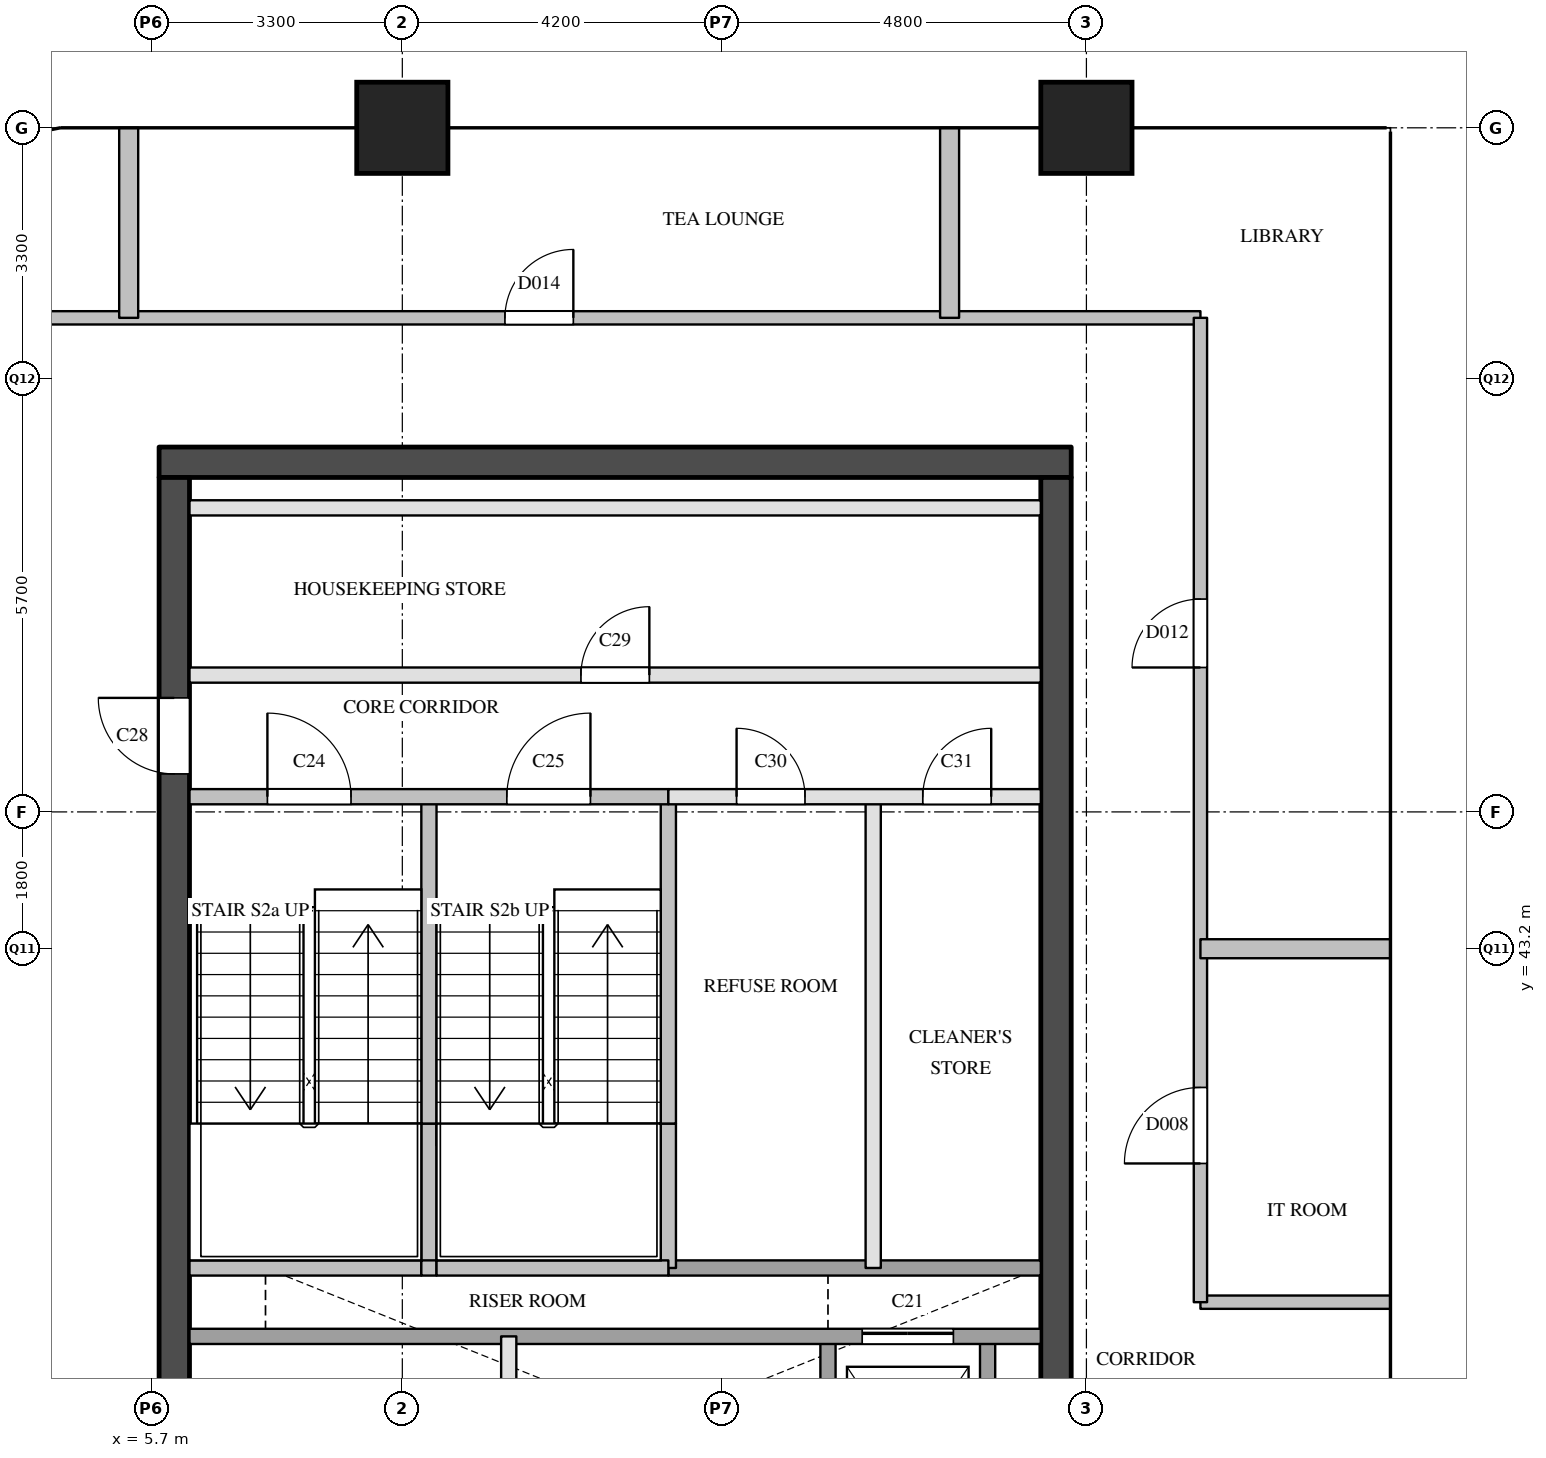
"""IFC4 building model, lengths in metres.
Left out: names, types, materials, properties, quantities, classifications, styles, units other than length and angle.
Written with IfcOpenShell. Run it as: python <this file> out.ifc"""

import sys

from ifc_helpers import new_model, si_unit, direction, frame, frame_2d, origin, origin_2d, place, context, subcontext, project, spatial, rectangle, extrude, element, fill, save


model = new_model("IFC4")
c1 = context("Model", 3, precision=1e-05, world=origin(), true_north=direction((0.0, 1.0)))
c2 = subcontext(c1, "Body", "Model", "MODEL_VIEW")
j1 = project(units=[si_unit("LENGTHUNIT", "METRE"), si_unit("PLANEANGLEUNIT", "RADIAN")], contexts=[c1])
p1 = place(None, origin())
s1 = spatial("IfcSite", under=j1, at=p1, CompositionType="ELEMENT")
p2 = place(p1, origin())
s2 = spatial("IfcBuilding", under=s1, at=p2, CompositionType="ELEMENT")
p3 = place(p2, frame((0.0, 0.0, 207.2)))
s3 = spatial("IfcBuildingStorey", under=s2, at=p3, CompositionType="ELEMENT", Elevation=207.2)
for number, where, z_axis, x_axis in (
    (1, (9.0, 54.0, 0.0), (0.0, 0.0, 1.0), (1.0, 0.0, 0.0)),
    (2, (18.0, 54.0, 0.0), (0.0, 0.0, 1.0), (1.0, 0.0, 0.0)),
):
    element("IfcColumn", number, at=place(p3, frame(where, z_axis=z_axis, x_axis=x_axis)), inside=s3, PredefinedType="COLUMN", context=c2, shape_type="SweptSolid", body=[
        extrude(rectangle(XDim=1.2, YDim=1.2, at=origin_2d()), origin(), (0.0, 0.0, 1.0), 3.9),
    ])
p4 = place(p3, frame((5.8, 49.6, 0.0), z_axis=(0.0, 0.0, 1.0), x_axis=(1.0, 0.0, 0.0)))
e3 = element("IfcWall", 3, at=p4, inside=s3, PredefinedType="SHEAR", context=c2, shape_type="SweptSolid", body=[
    extrude(rectangle(XDim=12.0, YDim=0.4, at=frame_2d((6.0, 0.0))), origin(), (0.0, 0.0, 1.0), 3.6),
])
p5 = place(p3, frame((6.0, 29.1, 0.0), z_axis=(0.0, 0.0, 1.0), x_axis=(0.0, 1.0, 0.0)))
e4 = element("IfcWall", 4, at=p5, inside=s3, PredefinedType="SHEAR", context=c2, shape_type="SweptSolid", body=[
    extrude(rectangle(XDim=20.3, YDim=0.4, at=frame_2d((10.15, 0.0))), origin(), (0.0, 0.0, 1.0), 3.6),
])
p6 = place(p5, frame((3.45, 0.0, 0.0)))
e5 = element("IfcOpeningElement", 5, at=p6, cuts=e4, PredefinedType="OPENING", context=c2, shape_type="SweptSolid", body=[
    extrude(rectangle(XDim=1.0, YDim=2.1, at=frame_2d((0.5, 1.05))), frame((0.0, 0.21, 0.0), z_axis=(0.0, -1.0, 0.0), x_axis=(1.0, 0.0, 0.0)), (0.0, 0.0, 1.0), 0.42),
])
p7 = place(p5, frame((16.4, 0.0, 0.0)))
e6 = element("IfcOpeningElement", 6, at=p7, cuts=e4, PredefinedType="OPENING", context=c2, shape_type="SweptSolid", body=[
    extrude(rectangle(XDim=1.0, YDim=2.1, at=frame_2d((0.5, 1.05))), frame((0.0, 0.21, 0.0), z_axis=(0.0, -1.0, 0.0), x_axis=(1.0, 0.0, 0.0)), (0.0, 0.0, 1.0), 0.42),
])
p8 = place(p3, frame((17.6, 29.1, 0.0), z_axis=(0.0, 0.0, 1.0), x_axis=(0.0, 1.0, 0.0)))
e7 = element("IfcWall", 7, at=p8, inside=s3, PredefinedType="SHEAR", context=c2, shape_type="SweptSolid", body=[
    extrude(rectangle(XDim=20.3, YDim=0.4, at=frame_2d((10.15, 0.0))), origin(), (0.0, 0.0, 1.0), 3.6),
])
p9 = place(p8, frame((1.25, 0.0, 0.0)))
e8 = element("IfcOpeningElement", 8, at=p9, cuts=e7, PredefinedType="OPENING", context=c2, shape_type="SweptSolid", body=[
    extrude(rectangle(XDim=0.7, YDim=2.1, at=frame_2d((0.35, 1.05))), frame((0.0, 0.21, 0.0), z_axis=(0.0, -1.0, 0.0), x_axis=(1.0, 0.0, 0.0)), (0.0, 0.0, 1.0), 0.42),
])
p10 = place(p8, frame((7.05, 0.0, 0.0)))
e9 = element("IfcOpeningElement", 9, at=p10, cuts=e7, PredefinedType="OPENING", context=c2, shape_type="SweptSolid", body=[
    extrude(rectangle(XDim=0.7, YDim=2.1, at=frame_2d((0.35, 1.05))), frame((0.0, 0.21, 0.0), z_axis=(0.0, -1.0, 0.0), x_axis=(1.0, 0.0, 0.0)), (0.0, 0.0, 1.0), 0.42),
])
p11 = place(p8, frame((3.6, 0.0, 0.0)))
e10 = element("IfcOpeningElement", 10, at=p11, cuts=e7, PredefinedType="OPENING", context=c2, shape_type="SweptSolid", body=[
    extrude(rectangle(XDim=1.8, YDim=2.1, at=frame_2d((0.9, 1.05))), frame((0.0, 0.21, 0.0), z_axis=(0.0, -1.0, 0.0), x_axis=(1.0, 0.0, 0.0)), (0.0, 0.0, 1.0), 0.42),
])
p12 = place(p3, frame((9.35, 39.0, 0.0), z_axis=(0.0, 0.0, 1.0), x_axis=(0.0, 1.0, 0.0)))
e11 = element("IfcWall", 11, at=p12, inside=s3, PredefinedType="SOLIDWALL", context=c2, shape_type="SweptSolid", body=[
    extrude(rectangle(XDim=1.9, YDim=0.2, at=frame_2d((0.95, 0.0))), origin(), (0.0, 0.0, 1.0), 3.6),
])
p13 = place(p3, frame((9.35, 40.9, 0.0), z_axis=(0.0, 0.0, 1.0), x_axis=(0.0, 1.0, 0.0)))
e12 = element("IfcWall", 12, at=p13, inside=s3, PredefinedType="SOLIDWALL", context=c2, shape_type="SweptSolid", body=[
    extrude(rectangle(XDim=4.3, YDim=0.2, at=frame_2d((2.15, 0.0))), origin(), (0.0, 0.0, 1.0), 3.6),
])
p14 = place(p3, frame((10.4, 33.8, 0.0), z_axis=(0.0, 0.0, 1.0), x_axis=(0.0, 1.0, 0.0)))
e13 = element("IfcWall", 13, at=p14, inside=s3, PredefinedType="PARTITIONING", context=c2, shape_type="SweptSolid", body=[
    extrude(rectangle(XDim=4.3, YDim=0.2, at=frame_2d((2.15, 0.0))), origin(), (0.0, 0.0, 1.0), 3.6),
])
p15 = place(p3, frame((12.5, 39.0, 0.0), z_axis=(0.0, 0.0, 1.0), x_axis=(0.0, 1.0, 0.0)))
e14 = element("IfcWall", 14, at=p15, inside=s3, PredefinedType="SOLIDWALL", context=c2, shape_type="SweptSolid", body=[
    extrude(rectangle(XDim=1.9, YDim=0.2, at=frame_2d((0.95, 0.0))), origin(), (0.0, 0.0, 1.0), 3.6),
])
p16 = place(p3, frame((12.5, 40.9, 0.0), z_axis=(0.0, 0.0, 1.0), x_axis=(0.0, 1.0, 0.0)))
e15 = element("IfcWall", 15, at=p16, inside=s3, PredefinedType="SOLIDWALL", context=c2, shape_type="SweptSolid", body=[
    extrude(rectangle(XDim=4.3, YDim=0.2, at=frame_2d((2.15, 0.0))), origin(), (0.0, 0.0, 1.0), 3.6),
])
p17 = place(p3, frame((14.6, 34.9, 0.0), z_axis=(0.0, 0.0, 1.0), x_axis=(0.0, 1.0, 0.0)))
e16 = element("IfcWall", 16, at=p17, inside=s3, PredefinedType="SOLIDWALL", context=c2, shape_type="SweptSolid", body=[
    extrude(rectangle(XDim=3.2, YDim=0.2, at=frame_2d((1.6, 0.0))), origin(), (0.0, 0.0, 1.0), 3.6),
])
p18 = place(p3, frame((15.195, 39.0, 0.0), z_axis=(0.0, 0.0, 1.0), x_axis=(0.0, 1.0, 0.0)))
e17 = element("IfcWall", 17, at=p18, inside=s3, PredefinedType="PARTITIONING", context=c2, shape_type="SweptSolid", body=[
    extrude(rectangle(XDim=6.2, YDim=0.2, at=frame_2d((3.1, 0.0))), origin(), (0.0, 0.0, 1.0), 3.6),
])
p19 = place(p3, frame((16.7, 34.9, 0.0), z_axis=(0.0, 0.0, 1.0), x_axis=(0.0, 1.0, 0.0)))
e18 = element("IfcWall", 18, at=p19, inside=s3, PredefinedType="SOLIDWALL", context=c2, shape_type="SweptSolid", body=[
    extrude(rectangle(XDim=3.2, YDim=0.2, at=frame_2d((1.6, 0.0))), origin(), (0.0, 0.0, 1.0), 3.6),
])
p20 = place(p3, frame((6.2, 38.1, 0.0), z_axis=(0.0, 0.0, 1.0), x_axis=(1.0, 0.0, 0.0)))
e19 = element("IfcWall", 19, at=p20, inside=s3, PredefinedType="SOLIDWALL", context=c2, shape_type="SweptSolid", body=[
    extrude(rectangle(XDim=11.2, YDim=0.2, at=frame_2d((5.6, 0.0))), origin(), (0.0, 0.0, 1.0), 3.6),
])
p21 = place(p20, frame((8.85, 0.0, 0.0)))
e20 = element("IfcOpeningElement", 20, at=p21, cuts=e19, PredefinedType="OPENING", context=c2, shape_type="SweptSolid", body=[
    extrude(rectangle(XDim=1.2, YDim=2.1, at=frame_2d((0.6, 1.05))), frame((0.0, 0.11, 0.0), z_axis=(0.0, -1.0, 0.0), x_axis=(1.0, 0.0, 0.0)), (0.0, 0.0, 1.0), 0.22),
])
p22 = place(p3, frame((12.5, 39.0, 0.0), z_axis=(0.0, 0.0, 1.0), x_axis=(1.0, 0.0, 0.0)))
e21 = element("IfcWall", 21, at=p22, inside=s3, PredefinedType="SOLIDWALL", context=c2, shape_type="SweptSolid", body=[
    extrude(rectangle(XDim=4.9, YDim=0.2, at=frame_2d((2.45, 0.0))), origin(), (0.0, 0.0, 1.0), 3.6),
])
p23 = place(p3, frame((6.2, 39.0, 0.0), z_axis=(0.0, 0.0, 1.0), x_axis=(1.0, 0.0, 0.0)))
e22 = element("IfcWall", 22, at=p23, inside=s3, PredefinedType="SOLIDWALL", context=c2, shape_type="SweptSolid", body=[
    extrude(rectangle(XDim=3.05, YDim=0.2, at=frame_2d((1.525, 0.0))), origin(), (0.0, 0.0, 1.0), 3.6),
])
p24 = place(p3, frame((9.25, 39.0, 0.0), z_axis=(0.0, 0.0, 1.0), x_axis=(1.0, 0.0, 0.0)))
e23 = element("IfcWall", 23, at=p24, inside=s3, PredefinedType="SOLIDWALL", context=c2, shape_type="SweptSolid", body=[
    extrude(rectangle(XDim=0.2, YDim=0.2, at=frame_2d((0.1, 0.0))), origin(), (0.0, 0.0, 1.0), 3.6),
])
p25 = place(p3, frame((9.45, 39.0, 0.0), z_axis=(0.0, 0.0, 1.0), x_axis=(1.0, 0.0, 0.0)))
e24 = element("IfcWall", 24, at=p25, inside=s3, PredefinedType="SOLIDWALL", context=c2, shape_type="SweptSolid", body=[
    extrude(rectangle(XDim=3.05, YDim=0.2, at=frame_2d((1.525, 0.0))), origin(), (0.0, 0.0, 1.0), 3.6),
])
p26 = place(p3, frame((12.5, 45.2, 0.0), z_axis=(0.0, 0.0, 1.0), x_axis=(1.0, 0.0, 0.0)))
e25 = element("IfcWall", 25, at=p26, inside=s3, PredefinedType="PARTITIONING", context=c2, shape_type="SweptSolid", body=[
    extrude(rectangle(XDim=4.9, YDim=0.2, at=frame_2d((2.45, 0.0))), origin(), (0.0, 0.0, 1.0), 3.6),
])
p27 = place(p26, frame((0.897, 0.0, 0.0)))
e26 = element("IfcOpeningElement", 26, at=p27, cuts=e25, PredefinedType="OPENING", context=c2, shape_type="SweptSolid", body=[
    extrude(rectangle(XDim=0.9, YDim=2.1, at=frame_2d((0.45, 1.05))), frame((0.0, 0.11, 0.0), z_axis=(0.0, -1.0, 0.0), x_axis=(1.0, 0.0, 0.0)), (0.0, 0.0, 1.0), 0.22),
])
p28 = place(p26, frame((3.347, 0.0, 0.0)))
e27 = element("IfcOpeningElement", 27, at=p28, cuts=e25, PredefinedType="OPENING", context=c2, shape_type="SweptSolid", body=[
    extrude(rectangle(XDim=0.9, YDim=2.1, at=frame_2d((0.45, 1.05))), frame((0.0, 0.11, 0.0), z_axis=(0.0, -1.0, 0.0), x_axis=(1.0, 0.0, 0.0)), (0.0, 0.0, 1.0), 0.22),
])
p29 = place(p3, frame((6.2, 45.2, 0.0), z_axis=(0.0, 0.0, 1.0), x_axis=(1.0, 0.0, 0.0)))
e28 = element("IfcWall", 28, at=p29, inside=s3, PredefinedType="SOLIDWALL", context=c2, shape_type="SweptSolid", body=[
    extrude(rectangle(XDim=6.3, YDim=0.2, at=frame_2d((3.15, 0.0))), origin(), (0.0, 0.0, 1.0), 3.6),
])
p30 = place(p29, frame((1.025, 0.0, 0.0)))
e29 = element("IfcOpeningElement", 29, at=p30, cuts=e28, PredefinedType="OPENING", context=c2, shape_type="SweptSolid", body=[
    extrude(rectangle(XDim=1.1, YDim=2.1, at=frame_2d((0.55, 1.05))), frame((0.0, 0.11, 0.0), z_axis=(0.0, -1.0, 0.0), x_axis=(1.0, 0.0, 0.0)), (0.0, 0.0, 1.0), 0.22),
])
p31 = place(p29, frame((4.175, 0.0, 0.0)))
e30 = element("IfcOpeningElement", 30, at=p31, cuts=e28, PredefinedType="OPENING", context=c2, shape_type="SweptSolid", body=[
    extrude(rectangle(XDim=1.1, YDim=2.1, at=frame_2d((0.55, 1.05))), frame((0.0, 0.11, 0.0), z_axis=(0.0, -1.0, 0.0), x_axis=(1.0, 0.0, 0.0)), (0.0, 0.0, 1.0), 0.22),
])
p32 = place(p3, frame((6.2, 46.8, 0.0), z_axis=(0.0, 0.0, 1.0), x_axis=(1.0, 0.0, 0.0)))
e31 = element("IfcWall", 31, at=p32, inside=s3, PredefinedType="PARTITIONING", context=c2, shape_type="SweptSolid", body=[
    extrude(rectangle(XDim=11.2, YDim=0.2, at=frame_2d((5.6, 0.0))), origin(), (0.0, 0.0, 1.0), 3.6),
])
p33 = place(p32, frame((5.15, 0.0, 0.0)))
e32 = element("IfcOpeningElement", 32, at=p33, cuts=e31, PredefinedType="OPENING", context=c2, shape_type="SweptSolid", body=[
    extrude(rectangle(XDim=0.9, YDim=2.1, at=frame_2d((0.45, 1.05))), frame((0.0, 0.11, 0.0), z_axis=(0.0, -1.0, 0.0), x_axis=(1.0, 0.0, 0.0)), (0.0, 0.0, 1.0), 0.22),
])
p34 = place(p3, frame((6.2, 49.0, 0.0), z_axis=(0.0, 0.0, 1.0), x_axis=(1.0, 0.0, 0.0)))
e33 = element("IfcWall", 33, at=p34, inside=s3, PredefinedType="PARTITIONING", context=c2, shape_type="SweptSolid", body=[
    extrude(rectangle(XDim=11.2, YDim=0.2, at=frame_2d((5.6, 0.0))), origin(), (0.0, 0.0, 1.0), 3.6),
])
p35 = place(p3, frame((19.5, 38.55, 0.0), z_axis=(0.0, 0.0, 1.0), x_axis=(1.0, 0.0, 0.0)))
e34 = element("IfcWall", 34, at=p35, inside=s3, PredefinedType="PARTITIONING", context=c2, shape_type="SweptSolid", body=[
    extrude(rectangle(XDim=2.5, YDim=0.175, at=frame_2d((1.25, 0.0))), origin(), (0.0, 0.0, 1.0), 3.6),
])
p36 = place(p3, frame((4.1, 51.5, 0.0), z_axis=(0.0, 0.0, 1.0), x_axis=(1.0, 0.0, 0.0)))
e35 = element("IfcWall", 35, at=p36, inside=s3, PredefinedType="PARTITIONING", context=c2, shape_type="SweptSolid", body=[
    extrude(rectangle(XDim=15.4, YDim=0.175, at=frame_2d((7.7, 0.0))), origin(), (0.0, 0.0, 1.0), 3.6),
])
p37 = place(p36, frame((6.25, 0.0, 0.0)))
e36 = element("IfcOpeningElement", 36, at=p37, cuts=e35, PredefinedType="OPENING", context=c2, shape_type="SweptSolid", body=[
    extrude(rectangle(XDim=0.9, YDim=2.1, at=frame_2d((0.45, 1.05))), frame((0.0, 0.097, 0.0), z_axis=(0.0, -1.0, 0.0), x_axis=(1.0, 0.0, 0.0)), (0.0, 0.0, 1.0), 0.195),
])
p38 = place(p3, frame((19.5, 38.55, 0.0), z_axis=(0.0, 0.0, 1.0), x_axis=(0.0, 1.0, 0.0)))
e37 = element("IfcWall", 37, at=p38, inside=s3, PredefinedType="PARTITIONING", context=c2, shape_type="SweptSolid", body=[
    extrude(rectangle(XDim=12.95, YDim=0.175, at=frame_2d((6.475, 0.0))), origin(), (0.0, 0.0, 1.0), 3.6),
])
p39 = place(p38, frame((1.825, 0.0, 0.0)))
e38 = element("IfcOpeningElement", 38, at=p39, cuts=e37, PredefinedType="OPENING", context=c2, shape_type="SweptSolid", body=[
    extrude(rectangle(XDim=1.0, YDim=2.1, at=frame_2d((0.5, 1.05))), frame((0.0, 0.097, 0.0), z_axis=(0.0, -1.0, 0.0), x_axis=(1.0, 0.0, 0.0)), (0.0, 0.0, 1.0), 0.195),
])
p40 = place(p38, frame((8.35, 0.0, 0.0)))
e39 = element("IfcOpeningElement", 39, at=p40, cuts=e37, PredefinedType="OPENING", context=c2, shape_type="SweptSolid", body=[
    extrude(rectangle(XDim=0.9, YDim=2.1, at=frame_2d((0.45, 1.05))), frame((0.0, 0.097, 0.0), z_axis=(0.0, -1.0, 0.0), x_axis=(1.0, 0.0, 0.0)), (0.0, 0.0, 1.0), 0.195),
])
p41 = place(p3, frame((19.5, 43.2, 0.0), z_axis=(0.0, 0.0, 1.0), x_axis=(1.0, 0.0, 0.0)))
e40 = element("IfcWall", 40, at=p41, inside=s3, PredefinedType="PARTITIONING", context=c2, shape_type="SweptSolid", body=[
    extrude(rectangle(XDim=2.5, YDim=0.25, at=frame_2d((1.25, 0.0))), origin(), (0.0, 0.0, 1.0), 3.6),
])
for number, where, z_axis, x_axis in (
    (41, (5.4, 51.5, 0.0), (0.0, 0.0, 1.0), (0.0, 1.0, 0.0)),
    (42, (16.2, 51.5, 0.0), (0.0, 0.0, 1.0), (0.0, 1.0, 0.0)),
):
    element("IfcWall", number, at=place(p3, frame(where, z_axis=z_axis, x_axis=x_axis)), inside=s3, PredefinedType="PARTITIONING", context=c2, shape_type="SweptSolid", body=[
        extrude(rectangle(XDim=2.5, YDim=0.25, at=frame_2d((1.25, 0.0))), origin(), (0.0, 0.0, 1.0), 2.6),
    ])
p42 = place(p21, origin())
e43 = element("IfcDoor", 43, at=p42, inside=s3, OperationType="SLIDING_TO_LEFT", PredefinedType="DOOR", context=c2, shape_type="SweptSolid", body=[
    extrude(rectangle(XDim=1.2, YDim=2.1, at=frame_2d((0.6, 1.05))), frame((0.0, 0.025, 0.0), z_axis=(0.0, -1.0, 0.0), x_axis=(1.0, 0.0, 0.0)), (0.0, 0.0, 1.0), 0.05),
])
fill(e20, e43)
p43 = place(p30, origin())
e44 = element("IfcDoor", 44, at=p43, inside=s3, OperationType="SINGLE_SWING_LEFT", PredefinedType="DOOR", context=c2, shape_type="SweptSolid", body=[
    extrude(rectangle(XDim=1.1, YDim=2.1, at=frame_2d((0.55, 1.05))), frame((0.0, 0.025, 0.0), z_axis=(0.0, -1.0, 0.0), x_axis=(1.0, 0.0, 0.0)), (0.0, 0.0, 1.0), 0.05),
])
fill(e29, e44)
p44 = place(p31, origin())
e45 = element("IfcDoor", 45, at=p44, inside=s3, OperationType="SINGLE_SWING_RIGHT", PredefinedType="DOOR", context=c2, shape_type="SweptSolid", body=[
    extrude(rectangle(XDim=1.1, YDim=2.1, at=frame_2d((0.55, 1.05))), frame((0.0, 0.025, 0.0), z_axis=(0.0, -1.0, 0.0), x_axis=(1.0, 0.0, 0.0)), (0.0, 0.0, 1.0), 0.05),
])
fill(e30, e45)
p45 = place(p7, origin())
e46 = element("IfcDoor", 46, at=p45, inside=s3, OperationType="SINGLE_SWING_RIGHT", PredefinedType="DOOR", context=c2, shape_type="SweptSolid", body=[
    extrude(rectangle(XDim=1.0, YDim=2.1, at=frame_2d((0.5, 1.05))), frame((0.0, 0.025, 0.0), z_axis=(0.0, -1.0, 0.0), x_axis=(1.0, 0.0, 0.0)), (0.0, 0.0, 1.0), 0.05),
])
fill(e6, e46)
p46 = place(p33, origin())
e47 = element("IfcDoor", 47, at=p46, inside=s3, OperationType="SINGLE_SWING_RIGHT", PredefinedType="DOOR", context=c2, shape_type="SweptSolid", body=[
    extrude(rectangle(XDim=0.9, YDim=2.1, at=frame_2d((0.45, 1.05))), frame((0.0, 0.025, 0.0), z_axis=(0.0, -1.0, 0.0), x_axis=(1.0, 0.0, 0.0)), (0.0, 0.0, 1.0), 0.05),
])
fill(e32, e47)
p47 = place(p27, origin())
e48 = element("IfcDoor", 48, at=p47, inside=s3, OperationType="SINGLE_SWING_LEFT", PredefinedType="DOOR", context=c2, shape_type="SweptSolid", body=[
    extrude(rectangle(XDim=0.9, YDim=2.1, at=frame_2d((0.45, 1.05))), frame((0.0, 0.025, 0.0), z_axis=(0.0, -1.0, 0.0), x_axis=(1.0, 0.0, 0.0)), (0.0, 0.0, 1.0), 0.05),
])
fill(e26, e48)
p48 = place(p28, origin())
e49 = element("IfcDoor", 49, at=p48, inside=s3, OperationType="SINGLE_SWING_RIGHT", PredefinedType="DOOR", context=c2, shape_type="SweptSolid", body=[
    extrude(rectangle(XDim=0.9, YDim=2.1, at=frame_2d((0.45, 1.05))), frame((0.0, 0.025, 0.0), z_axis=(0.0, -1.0, 0.0), x_axis=(1.0, 0.0, 0.0)), (0.0, 0.0, 1.0), 0.05),
])
fill(e27, e49)
p49 = place(p39, origin())
e50 = element("IfcDoor", 50, at=p49, inside=s3, OperationType="SINGLE_SWING_LEFT", PredefinedType="DOOR", context=c2, shape_type="SweptSolid", body=[
    extrude(rectangle(XDim=1.0, YDim=2.1, at=frame_2d((0.5, 1.05))), frame((0.0, 0.025, 0.0), z_axis=(0.0, -1.0, 0.0), x_axis=(1.0, 0.0, 0.0)), (0.0, 0.0, 1.0), 0.05),
])
fill(e38, e50)
p50 = place(p40, origin())
e51 = element("IfcDoor", 51, at=p50, inside=s3, OperationType="SINGLE_SWING_LEFT", PredefinedType="DOOR", context=c2, shape_type="SweptSolid", body=[
    extrude(rectangle(XDim=0.9, YDim=2.1, at=frame_2d((0.45, 1.05))), frame((0.0, 0.025, 0.0), z_axis=(0.0, -1.0, 0.0), x_axis=(1.0, 0.0, 0.0)), (0.0, 0.0, 1.0), 0.05),
])
fill(e39, e51)
p51 = place(p37, origin())
e52 = element("IfcDoor", 52, at=p51, inside=s3, OperationType="SINGLE_SWING_RIGHT", PredefinedType="DOOR", context=c2, shape_type="SweptSolid", body=[
    extrude(rectangle(XDim=0.9, YDim=2.1, at=frame_2d((0.45, 1.05))), frame((0.0, 0.025, 0.0), z_axis=(0.0, -1.0, 0.0), x_axis=(1.0, 0.0, 0.0)), (0.0, 0.0, 1.0), 0.05),
])
fill(e36, e52)
save(model, sys.argv[1])
